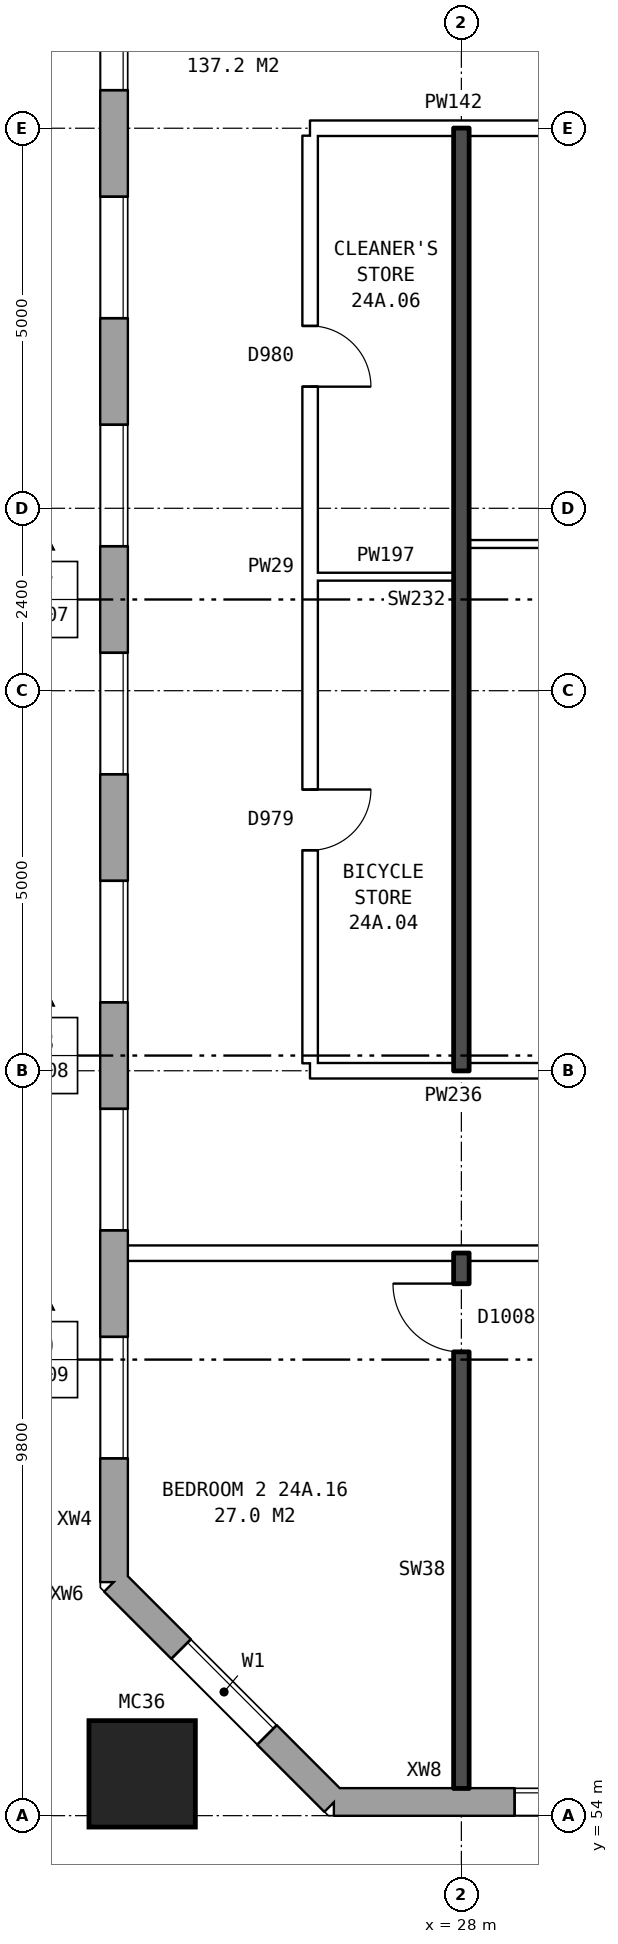
"""IFC4 building model, lengths in metres.
Left out: names, types, materials, properties, quantities, classifications, styles, units other than length and angle.
Written with IfcOpenShell. Run it as: python <this file> out.ifc"""

import sys

from ifc_helpers import new_model, si_unit, direction, frame, frame_2d, origin, origin_2d, place, context, subcontext, project, spatial, rectangle, hollow_rectangle, extrude, element, fill, save


model = new_model("IFC4")
c1 = context("Model", 3, precision=1e-05, world=origin(), true_north=direction((0.0, 1.0)))
c2 = subcontext(c1, "Body", "Model", "MODEL_VIEW")
j1 = project(units=[si_unit("LENGTHUNIT", "METRE"), si_unit("PLANEANGLEUNIT", "RADIAN")], contexts=[c1])
p1 = place(None, origin())
s1 = spatial("IfcSite", under=j1, at=p1, CompositionType="ELEMENT")
p2 = place(p1, origin())
s2 = spatial("IfcBuilding", under=s1, at=p2, CompositionType="ELEMENT")
p3 = place(p2, frame((0.0, 0.0, 87.1)))
s3 = spatial("IfcBuildingStorey", under=s2, at=p3, CompositionType="ELEMENT", Elevation=87.1)
p4 = place(p3, frame((23.8, 54.55, 0.0), z_axis=(0.0, 0.0, 1.0), x_axis=(1.0, 0.0, 0.0)))
e1 = element("IfcColumn", 1, at=p4, inside=s3, PredefinedType="COLUMN", context=c2, shape_type="SweptSolid", body=[
    extrude(hollow_rectangle(XDim=1.4, YDim=1.4, WallThickness=0.075, at=origin_2d()), origin(), (0.0, 0.0, 1.0), 3.1),
])
p5 = place(p3, frame((23.43, 57.075, 0.0), z_axis=(0.0, 0.0, 1.0), x_axis=(0.707106781187, -0.707106781187, 0.0)))
e2 = element("IfcWall", 2, at=p5, inside=s3, PredefinedType="STANDARD", context=c2, shape_type="SweptSolid", body=[
    extrude(rectangle(XDim=4.094, YDim=0.36, at=frame_2d((2.047, 0.0))), origin(), (0.0, 0.0, 1.0), 2.85),
])
p6 = place(p5, frame((1.247, 0.0, 0.8)))
e3 = element("IfcOpeningElement", 3, at=p6, cuts=e2, PredefinedType="OPENING", context=c2, shape_type="SweptSolid", body=[
    extrude(rectangle(XDim=1.6, YDim=1.8, at=frame_2d((0.8, 0.9))), frame((0.0, 0.19, 0.0), z_axis=(0.0, -1.0, 0.0), x_axis=(1.0, 0.0, 0.0)), (0.0, 0.0, 1.0), 0.38),
])
p7 = place(p3, frame((26.325, 54.18, 0.0), z_axis=(0.0, 0.0, 1.0), x_axis=(1.0, 0.0, 0.0)))
e4 = element("IfcWall", 4, at=p7, inside=s3, PredefinedType="STANDARD", context=c2, shape_type="SweptSolid", body=[
    extrude(rectangle(XDim=46.601, YDim=0.36, at=frame_2d((23.3, 0.0))), origin(), (0.0, 0.0, 1.0), 2.85),
])
p8 = place(p7, frame((2.375, 0.0, 0.8)))
e5 = element("IfcOpeningElement", 5, at=p8, cuts=e4, PredefinedType="OPENING", context=c2, shape_type="SweptSolid", body=[
    extrude(rectangle(XDim=1.6, YDim=1.8, at=frame_2d((0.8, 0.9))), frame((0.0, 0.19, 0.0), z_axis=(0.0, -1.0, 0.0), x_axis=(1.0, 0.0, 0.0)), (0.0, 0.0, 1.0), 0.38),
])
p9 = place(p7, frame((5.375, 0.0, 0.8)))
e6 = element("IfcOpeningElement", 6, at=p9, cuts=e4, PredefinedType="OPENING", context=c2, shape_type="SweptSolid", body=[
    extrude(rectangle(XDim=1.6, YDim=1.8, at=frame_2d((0.8, 0.9))), frame((0.0, 0.19, 0.0), z_axis=(0.0, -1.0, 0.0), x_axis=(1.0, 0.0, 0.0)), (0.0, 0.0, 1.0), 0.38),
])
p10 = place(p7, frame((8.375, 0.0, 0.8)))
e7 = element("IfcOpeningElement", 7, at=p10, cuts=e4, PredefinedType="OPENING", context=c2, shape_type="SweptSolid", body=[
    extrude(rectangle(XDim=1.6, YDim=1.8, at=frame_2d((0.8, 0.9))), frame((0.0, 0.19, 0.0), z_axis=(0.0, -1.0, 0.0), x_axis=(1.0, 0.0, 0.0)), (0.0, 0.0, 1.0), 0.38),
])
p11 = place(p7, frame((11.375, 0.0, 0.8)))
e8 = element("IfcOpeningElement", 8, at=p11, cuts=e4, PredefinedType="OPENING", context=c2, shape_type="SweptSolid", body=[
    extrude(rectangle(XDim=1.6, YDim=1.8, at=frame_2d((0.8, 0.9))), frame((0.0, 0.19, 0.0), z_axis=(0.0, -1.0, 0.0), x_axis=(1.0, 0.0, 0.0)), (0.0, 0.0, 1.0), 0.38),
])
p12 = place(p7, frame((14.375, 0.0, 0.8)))
e9 = element("IfcOpeningElement", 9, at=p12, cuts=e4, PredefinedType="OPENING", context=c2, shape_type="SweptSolid", body=[
    extrude(rectangle(XDim=1.6, YDim=1.8, at=frame_2d((0.8, 0.9))), frame((0.0, 0.19, 0.0), z_axis=(0.0, -1.0, 0.0), x_axis=(1.0, 0.0, 0.0)), (0.0, 0.0, 1.0), 0.38),
])
p13 = place(p7, frame((17.375, 0.0, 0.8)))
e10 = element("IfcOpeningElement", 10, at=p13, cuts=e4, PredefinedType="OPENING", context=c2, shape_type="SweptSolid", body=[
    extrude(rectangle(XDim=1.6, YDim=1.8, at=frame_2d((0.8, 0.9))), frame((0.0, 0.19, 0.0), z_axis=(0.0, -1.0, 0.0), x_axis=(1.0, 0.0, 0.0)), (0.0, 0.0, 1.0), 0.38),
])
p14 = place(p7, frame((19.875, 0.0, 1.4)))
e11 = element("IfcOpeningElement", 11, at=p14, cuts=e4, PredefinedType="OPENING", context=c2, shape_type="SweptSolid", body=[
    extrude(rectangle(XDim=1.2, YDim=1.2, at=frame_2d((0.6, 0.6))), frame((0.0, 0.19, 0.0), z_axis=(0.0, -1.0, 0.0), x_axis=(1.0, 0.0, 0.0)), (0.0, 0.0, 1.0), 0.38),
])
p15 = place(p7, frame((22.825, 0.0, 0.25)))
e12 = element("IfcOpeningElement", 12, at=p15, cuts=e4, PredefinedType="OPENING", context=c2, shape_type="SweptSolid", body=[
    extrude(rectangle(XDim=0.8, YDim=1.5, at=frame_2d((0.4, 0.75))), frame((0.0, 0.19, 0.0), z_axis=(0.0, -1.0, 0.0), x_axis=(1.0, 0.0, 0.0)), (0.0, 0.0, 1.0), 0.38),
])
p16 = place(p7, frame((26.375, 0.0, 0.8)))
e13 = element("IfcOpeningElement", 13, at=p16, cuts=e4, PredefinedType="OPENING", context=c2, shape_type="SweptSolid", body=[
    extrude(rectangle(XDim=1.6, YDim=1.8, at=frame_2d((0.8, 0.9))), frame((0.0, 0.19, 0.0), z_axis=(0.0, -1.0, 0.0), x_axis=(1.0, 0.0, 0.0)), (0.0, 0.0, 1.0), 0.38),
])
p17 = place(p7, frame((29.375, 0.0, 0.8)))
e14 = element("IfcOpeningElement", 14, at=p17, cuts=e4, PredefinedType="OPENING", context=c2, shape_type="SweptSolid", body=[
    extrude(rectangle(XDim=1.6, YDim=1.8, at=frame_2d((0.8, 0.9))), frame((0.0, 0.19, 0.0), z_axis=(0.0, -1.0, 0.0), x_axis=(1.0, 0.0, 0.0)), (0.0, 0.0, 1.0), 0.38),
])
p18 = place(p7, frame((32.375, 0.0, 0.8)))
e15 = element("IfcOpeningElement", 15, at=p18, cuts=e4, PredefinedType="OPENING", context=c2, shape_type="SweptSolid", body=[
    extrude(rectangle(XDim=1.6, YDim=1.8, at=frame_2d((0.8, 0.9))), frame((0.0, 0.19, 0.0), z_axis=(0.0, -1.0, 0.0), x_axis=(1.0, 0.0, 0.0)), (0.0, 0.0, 1.0), 0.38),
])
p19 = place(p7, frame((35.375, 0.0, 0.8)))
e16 = element("IfcOpeningElement", 16, at=p19, cuts=e4, PredefinedType="OPENING", context=c2, shape_type="SweptSolid", body=[
    extrude(rectangle(XDim=1.6, YDim=1.8, at=frame_2d((0.8, 0.9))), frame((0.0, 0.19, 0.0), z_axis=(0.0, -1.0, 0.0), x_axis=(1.0, 0.0, 0.0)), (0.0, 0.0, 1.0), 0.38),
])
p20 = place(p7, frame((38.375, 0.0, 0.8)))
e17 = element("IfcOpeningElement", 17, at=p20, cuts=e4, PredefinedType="OPENING", context=c2, shape_type="SweptSolid", body=[
    extrude(rectangle(XDim=1.6, YDim=1.8, at=frame_2d((0.8, 0.9))), frame((0.0, 0.19, 0.0), z_axis=(0.0, -1.0, 0.0), x_axis=(1.0, 0.0, 0.0)), (0.0, 0.0, 1.0), 0.38),
])
p21 = place(p7, frame((41.375, 0.0, 0.8)))
e18 = element("IfcOpeningElement", 18, at=p21, cuts=e4, PredefinedType="OPENING", context=c2, shape_type="SweptSolid", body=[
    extrude(rectangle(XDim=1.6, YDim=1.8, at=frame_2d((0.8, 0.9))), frame((0.0, 0.19, 0.0), z_axis=(0.0, -1.0, 0.0), x_axis=(1.0, 0.0, 0.0)), (0.0, 0.0, 1.0), 0.38),
])
p22 = place(p7, frame((44.375, 0.0, 0.8)))
e19 = element("IfcOpeningElement", 19, at=p22, cuts=e4, PredefinedType="OPENING", context=c2, shape_type="SweptSolid", body=[
    extrude(rectangle(XDim=1.6, YDim=1.8, at=frame_2d((0.8, 0.9))), frame((0.0, 0.19, 0.0), z_axis=(0.0, -1.0, 0.0), x_axis=(1.0, 0.0, 0.0)), (0.0, 0.0, 1.0), 0.38),
])
p23 = place(p7, frame((23.925, 0.0, 0.15)))
e20 = element("IfcOpeningElement", 20, at=p23, cuts=e4, PredefinedType="OPENING", context=c2, shape_type="SweptSolid", body=[
    extrude(rectangle(XDim=0.6, YDim=0.9, at=frame_2d((0.3, 0.45))), frame((0.0, 0.19, 0.0), z_axis=(0.0, -1.0, 0.0), x_axis=(1.0, 0.0, 0.0)), (0.0, 0.0, 1.0), 0.38),
])
p24 = place(p3, frame((23.43, 82.925, 0.0), z_axis=(0.0, 0.0, 1.0), x_axis=(0.0, -1.0, 0.0)))
e21 = element("IfcWall", 21, at=p24, inside=s3, PredefinedType="STANDARD", context=c2, shape_type="SweptSolid", body=[
    extrude(rectangle(XDim=25.851, YDim=0.36, at=frame_2d((12.925, 0.0))), origin(), (0.0, 0.0, 1.0), 2.85),
])
p25 = place(p24, frame((1.625, 0.0, 0.8)))
e22 = element("IfcOpeningElement", 22, at=p25, cuts=e21, PredefinedType="OPENING", context=c2, shape_type="SweptSolid", body=[
    extrude(rectangle(XDim=1.6, YDim=1.8, at=frame_2d((0.8, 0.9))), frame((0.0, 0.19, 0.0), z_axis=(0.0, -1.0, 0.0), x_axis=(1.0, 0.0, 0.0)), (0.0, 0.0, 1.0), 0.38),
])
p26 = place(p24, frame((4.625, 0.0, 0.8)))
e23 = element("IfcOpeningElement", 23, at=p26, cuts=e21, PredefinedType="OPENING", context=c2, shape_type="SweptSolid", body=[
    extrude(rectangle(XDim=1.6, YDim=1.8, at=frame_2d((0.8, 0.9))), frame((0.0, 0.19, 0.0), z_axis=(0.0, -1.0, 0.0), x_axis=(1.0, 0.0, 0.0)), (0.0, 0.0, 1.0), 0.38),
])
p27 = place(p24, frame((7.625, 0.0, 0.8)))
e24 = element("IfcOpeningElement", 24, at=p27, cuts=e21, PredefinedType="OPENING", context=c2, shape_type="SweptSolid", body=[
    extrude(rectangle(XDim=1.6, YDim=1.8, at=frame_2d((0.8, 0.9))), frame((0.0, 0.19, 0.0), z_axis=(0.0, -1.0, 0.0), x_axis=(1.0, 0.0, 0.0)), (0.0, 0.0, 1.0), 0.38),
])
p28 = place(p24, frame((10.625, 0.0, 0.8)))
e25 = element("IfcOpeningElement", 25, at=p28, cuts=e21, PredefinedType="OPENING", context=c2, shape_type="SweptSolid", body=[
    extrude(rectangle(XDim=1.6, YDim=1.8, at=frame_2d((0.8, 0.9))), frame((0.0, 0.19, 0.0), z_axis=(0.0, -1.0, 0.0), x_axis=(1.0, 0.0, 0.0)), (0.0, 0.0, 1.0), 0.38),
])
p29 = place(p24, frame((13.625, 0.0, 0.8)))
e26 = element("IfcOpeningElement", 26, at=p29, cuts=e21, PredefinedType="OPENING", context=c2, shape_type="SweptSolid", body=[
    extrude(rectangle(XDim=1.6, YDim=1.8, at=frame_2d((0.8, 0.9))), frame((0.0, 0.19, 0.0), z_axis=(0.0, -1.0, 0.0), x_axis=(1.0, 0.0, 0.0)), (0.0, 0.0, 1.0), 0.38),
])
p30 = place(p24, frame((16.625, 0.0, 0.8)))
e27 = element("IfcOpeningElement", 27, at=p30, cuts=e21, PredefinedType="OPENING", context=c2, shape_type="SweptSolid", body=[
    extrude(rectangle(XDim=1.6, YDim=1.8, at=frame_2d((0.8, 0.9))), frame((0.0, 0.19, 0.0), z_axis=(0.0, -1.0, 0.0), x_axis=(1.0, 0.0, 0.0)), (0.0, 0.0, 1.0), 0.38),
])
p31 = place(p24, frame((19.625, 0.0, 0.8)))
e28 = element("IfcOpeningElement", 28, at=p31, cuts=e21, PredefinedType="OPENING", context=c2, shape_type="SweptSolid", body=[
    extrude(rectangle(XDim=1.6, YDim=1.8, at=frame_2d((0.8, 0.9))), frame((0.0, 0.19, 0.0), z_axis=(0.0, -1.0, 0.0), x_axis=(1.0, 0.0, 0.0)), (0.0, 0.0, 1.0), 0.38),
])
p32 = place(p24, frame((22.625, 0.0, 0.8)))
e29 = element("IfcOpeningElement", 29, at=p32, cuts=e21, PredefinedType="OPENING", context=c2, shape_type="SweptSolid", body=[
    extrude(rectangle(XDim=1.6, YDim=1.8, at=frame_2d((0.8, 0.9))), frame((0.0, 0.19, 0.0), z_axis=(0.0, -1.0, 0.0), x_axis=(1.0, 0.0, 0.0)), (0.0, 0.0, 1.0), 0.38),
])
p33 = place(p3, frame((23.61, 61.4, 0.0), z_axis=(0.0, 0.0, 1.0), x_axis=(1.0, 0.0, 0.0)))
e30 = element("IfcWall", 30, at=p33, inside=s3, PredefinedType="PARTITIONING", context=c2, shape_type="SweptSolid", body=[
    extrude(rectangle(XDim=22.29, YDim=0.2, at=frame_2d((11.145, 0.0))), origin(), (0.0, 0.0, 1.0), 2.85),
])
p34 = place(p33, frame((18.84, 0.0, 0.0)))
e31 = element("IfcOpeningElement", 31, at=p34, cuts=e30, PredefinedType="OPENING", context=c2, shape_type="SweptSolid", body=[
    extrude(rectangle(XDim=1.0, YDim=2.1, at=frame_2d((0.5, 1.05))), frame((0.0, 0.11, 0.0), z_axis=(0.0, -1.0, 0.0), x_axis=(1.0, 0.0, 0.0)), (0.0, 0.0, 1.0), 0.22),
])
p35 = place(p33, frame((6.89, 0.0, 0.0)))
e32 = element("IfcOpeningElement", 32, at=p35, cuts=e30, PredefinedType="OPENING", context=c2, shape_type="SweptSolid", body=[
    extrude(rectangle(XDim=1.0, YDim=2.1, at=frame_2d((0.5, 1.05))), frame((0.0, 0.11, 0.0), z_axis=(0.0, -1.0, 0.0), x_axis=(1.0, 0.0, 0.0)), (0.0, 0.0, 1.0), 0.22),
])
p36 = place(p3, frame((26.01, 63.8, 0.0), z_axis=(0.0, 0.0, 1.0), x_axis=(1.0, 0.0, 0.0)))
e33 = element("IfcWall", 33, at=p36, inside=s3, PredefinedType="PARTITIONING", context=c2, shape_type="SweptSolid", body=[
    extrude(rectangle(XDim=6.35, YDim=0.2, at=frame_2d((3.175, 0.0))), origin(), (0.0, 0.0, 1.0), 2.85),
])
p37 = place(p36, frame((3.77, 0.0, 0.0)))
e34 = element("IfcOpeningElement", 34, at=p37, cuts=e33, PredefinedType="OPENING", context=c2, shape_type="SweptSolid", body=[
    extrude(rectangle(XDim=0.8, YDim=2.1, at=frame_2d((0.4, 1.05))), frame((0.0, 0.11, 0.0), z_axis=(0.0, -1.0, 0.0), x_axis=(1.0, 0.0, 0.0)), (0.0, 0.0, 1.0), 0.22),
])
p38 = place(p3, frame((26.11, 70.3, 0.0), z_axis=(0.0, 0.0, 1.0), x_axis=(1.0, 0.0, 0.0)))
e35 = element("IfcWall", 35, at=p38, inside=s3, PredefinedType="PARTITIONING", context=c2, shape_type="SweptSolid", body=[
    extrude(rectangle(XDim=1.79, YDim=0.1, at=frame_2d((0.895, 0.0))), origin(), (0.0, 0.0, 1.0), 2.85),
])
p39 = place(p3, frame((28.1, 70.73, 0.0), z_axis=(0.0, 0.0, 1.0), x_axis=(1.0, 0.0, 0.0)))
e36 = element("IfcWall", 36, at=p39, inside=s3, PredefinedType="PARTITIONING", context=c2, shape_type="SweptSolid", body=[
    extrude(rectangle(XDim=4.26, YDim=0.1, at=frame_2d((2.13, 0.0))), origin(), (0.0, 0.0, 1.0), 2.85),
])
p40 = place(p3, frame((26.01, 76.2, 0.0), z_axis=(0.0, 0.0, 1.0), x_axis=(1.0, 0.0, 0.0)))
e37 = element("IfcWall", 37, at=p40, inside=s3, PredefinedType="PARTITIONING", context=c2, shape_type="SweptSolid", body=[
    extrude(rectangle(XDim=6.35, YDim=0.2, at=frame_2d((3.175, 0.0))), origin(), (0.0, 0.0, 1.0), 2.85),
])
p41 = place(p40, frame((3.77, 0.0, 0.0)))
e38 = element("IfcOpeningElement", 38, at=p41, cuts=e37, PredefinedType="OPENING", context=c2, shape_type="SweptSolid", body=[
    extrude(rectangle(XDim=0.8, YDim=2.1, at=frame_2d((0.4, 1.05))), frame((0.0, 0.11, 0.0), z_axis=(0.0, -1.0, 0.0), x_axis=(1.0, 0.0, 0.0)), (0.0, 0.0, 1.0), 0.22),
])
p42 = place(p3, frame((26.01, 63.9, 0.0), z_axis=(0.0, 0.0, 1.0), x_axis=(0.0, 1.0, 0.0)))
e39 = element("IfcWall", 39, at=p42, inside=s3, PredefinedType="PARTITIONING", context=c2, shape_type="SweptSolid", body=[
    extrude(rectangle(XDim=12.2, YDim=0.2, at=frame_2d((6.1, 0.0))), origin(), (0.0, 0.0, 1.0), 2.85),
])
p43 = place(p42, frame((2.8, 0.0, 0.0)))
e40 = element("IfcOpeningElement", 40, at=p43, cuts=e39, PredefinedType="OPENING", context=c2, shape_type="SweptSolid", body=[
    extrude(rectangle(XDim=0.8, YDim=2.1, at=frame_2d((0.4, 1.05))), frame((0.0, 0.11, 0.0), z_axis=(0.0, -1.0, 0.0), x_axis=(1.0, 0.0, 0.0)), (0.0, 0.0, 1.0), 0.22),
])
p44 = place(p42, frame((8.9, 0.0, 0.0)))
e41 = element("IfcOpeningElement", 41, at=p44, cuts=e39, PredefinedType="OPENING", context=c2, shape_type="SweptSolid", body=[
    extrude(rectangle(XDim=0.8, YDim=2.1, at=frame_2d((0.4, 1.05))), frame((0.0, 0.11, 0.0), z_axis=(0.0, -1.0, 0.0), x_axis=(1.0, 0.0, 0.0)), (0.0, 0.0, 1.0), 0.22),
])
p45 = place(p3, frame((28.0, 54.36, 0.0), z_axis=(0.0, 0.0, 1.0), x_axis=(0.0, 1.0, 0.0)))
e42 = element("IfcWall", 42, at=p45, inside=s3, PredefinedType="SOLIDWALL", context=c2, shape_type="SweptSolid", body=[
    extrude(rectangle(XDim=7.04, YDim=0.2, at=frame_2d((3.52, 0.0))), origin(), (0.0, 0.0, 1.0), 2.85),
])
p46 = place(p45, frame((5.74, 0.0, 0.0)))
e43 = element("IfcOpeningElement", 43, at=p46, cuts=e42, PredefinedType="OPENING", context=c2, shape_type="SweptSolid", body=[
    extrude(rectangle(XDim=0.9, YDim=2.1, at=frame_2d((0.45, 1.05))), frame((0.0, 0.11, 0.0), z_axis=(0.0, -1.0, 0.0), x_axis=(1.0, 0.0, 0.0)), (0.0, 0.0, 1.0), 0.22),
])
p47 = place(p3, frame((28.0, 63.8, 0.0), z_axis=(0.0, 0.0, 1.0), x_axis=(0.0, 1.0, 0.0)))
e44 = element("IfcWall", 44, at=p47, inside=s3, PredefinedType="SOLIDWALL", context=c2, shape_type="SweptSolid", body=[
    extrude(rectangle(XDim=12.4, YDim=0.2, at=frame_2d((6.2, 0.0))), origin(), (0.0, 0.0, 1.0), 2.85),
])
p48 = place(p6, origin())
e45 = element("IfcWindow", 45, at=p48, inside=s3, PartitioningType="SINGLE_PANEL", PredefinedType="WINDOW", context=c2, shape_type="SweptSolid", body=[
    extrude(rectangle(XDim=1.6, YDim=1.8, at=frame_2d((0.8, 0.9))), frame((0.0, 0.15, 0.0), z_axis=(0.0, -1.0, 0.0), x_axis=(1.0, 0.0, 0.0)), (0.0, 0.0, 1.0), 0.06),
])
fill(e3, e45)
p49 = place(p8, origin())
e46 = element("IfcWindow", 46, at=p49, inside=s3, PartitioningType="SINGLE_PANEL", PredefinedType="WINDOW", context=c2, shape_type="SweptSolid", body=[
    extrude(rectangle(XDim=1.6, YDim=1.8, at=frame_2d((0.8, 0.9))), frame((0.0, 0.15, 0.0), z_axis=(0.0, -1.0, 0.0), x_axis=(1.0, 0.0, 0.0)), (0.0, 0.0, 1.0), 0.06),
])
fill(e5, e46)
p50 = place(p26, origin())
e47 = element("IfcWindow", 47, at=p50, inside=s3, PartitioningType="SINGLE_PANEL", PredefinedType="WINDOW", context=c2, shape_type="SweptSolid", body=[
    extrude(rectangle(XDim=1.6, YDim=1.8, at=frame_2d((0.8, 0.9))), frame((0.0, 0.15, 0.0), z_axis=(0.0, -1.0, 0.0), x_axis=(1.0, 0.0, 0.0)), (0.0, 0.0, 1.0), 0.06),
])
fill(e23, e47)
p51 = place(p27, origin())
e48 = element("IfcWindow", 48, at=p51, inside=s3, PartitioningType="SINGLE_PANEL", PredefinedType="WINDOW", context=c2, shape_type="SweptSolid", body=[
    extrude(rectangle(XDim=1.6, YDim=1.8, at=frame_2d((0.8, 0.9))), frame((0.0, 0.15, 0.0), z_axis=(0.0, -1.0, 0.0), x_axis=(1.0, 0.0, 0.0)), (0.0, 0.0, 1.0), 0.06),
])
fill(e24, e48)
p52 = place(p28, origin())
e49 = element("IfcWindow", 49, at=p52, inside=s3, PartitioningType="SINGLE_PANEL", PredefinedType="WINDOW", context=c2, shape_type="SweptSolid", body=[
    extrude(rectangle(XDim=1.6, YDim=1.8, at=frame_2d((0.8, 0.9))), frame((0.0, 0.15, 0.0), z_axis=(0.0, -1.0, 0.0), x_axis=(1.0, 0.0, 0.0)), (0.0, 0.0, 1.0), 0.06),
])
fill(e25, e49)
p53 = place(p29, origin())
e50 = element("IfcWindow", 50, at=p53, inside=s3, PartitioningType="SINGLE_PANEL", PredefinedType="WINDOW", context=c2, shape_type="SweptSolid", body=[
    extrude(rectangle(XDim=1.6, YDim=1.8, at=frame_2d((0.8, 0.9))), frame((0.0, 0.15, 0.0), z_axis=(0.0, -1.0, 0.0), x_axis=(1.0, 0.0, 0.0)), (0.0, 0.0, 1.0), 0.06),
])
fill(e26, e50)
p54 = place(p30, origin())
e51 = element("IfcWindow", 51, at=p54, inside=s3, PartitioningType="SINGLE_PANEL", PredefinedType="WINDOW", context=c2, shape_type="SweptSolid", body=[
    extrude(rectangle(XDim=1.6, YDim=1.8, at=frame_2d((0.8, 0.9))), frame((0.0, 0.15, 0.0), z_axis=(0.0, -1.0, 0.0), x_axis=(1.0, 0.0, 0.0)), (0.0, 0.0, 1.0), 0.06),
])
fill(e27, e51)
p55 = place(p31, origin())
e52 = element("IfcWindow", 52, at=p55, inside=s3, PartitioningType="SINGLE_PANEL", PredefinedType="WINDOW", context=c2, shape_type="SweptSolid", body=[
    extrude(rectangle(XDim=1.6, YDim=1.8, at=frame_2d((0.8, 0.9))), frame((0.0, 0.15, 0.0), z_axis=(0.0, -1.0, 0.0), x_axis=(1.0, 0.0, 0.0)), (0.0, 0.0, 1.0), 0.06),
])
fill(e28, e52)
p56 = place(p32, origin())
e53 = element("IfcWindow", 53, at=p56, inside=s3, PartitioningType="SINGLE_PANEL", PredefinedType="WINDOW", context=c2, shape_type="SweptSolid", body=[
    extrude(rectangle(XDim=1.6, YDim=1.8, at=frame_2d((0.8, 0.9))), frame((0.0, 0.15, 0.0), z_axis=(0.0, -1.0, 0.0), x_axis=(1.0, 0.0, 0.0)), (0.0, 0.0, 1.0), 0.06),
])
fill(e29, e53)
p57 = place(p43, frame((0.8, 0.0, 0.0), z_axis=(0.0, 0.0, 1.0), x_axis=(-1.0, 0.0, 0.0)))
e54 = element("IfcDoor", 54, at=p57, inside=s3, OperationType="SINGLE_SWING_LEFT", PredefinedType="DOOR", context=c2, shape_type="SweptSolid", body=[
    extrude(rectangle(XDim=0.8, YDim=2.1, at=frame_2d((0.4, 1.05))), frame((0.0, 0.025, 0.0), z_axis=(0.0, -1.0, 0.0), x_axis=(1.0, 0.0, 0.0)), (0.0, 0.0, 1.0), 0.05),
])
fill(e40, e54)
p58 = place(p44, frame((0.8, 0.0, 0.0), z_axis=(0.0, 0.0, 1.0), x_axis=(-1.0, 0.0, 0.0)))
e55 = element("IfcDoor", 55, at=p58, inside=s3, OperationType="SINGLE_SWING_RIGHT", PredefinedType="DOOR", context=c2, shape_type="SweptSolid", body=[
    extrude(rectangle(XDim=0.8, YDim=2.1, at=frame_2d((0.4, 1.05))), frame((0.0, 0.025, 0.0), z_axis=(0.0, -1.0, 0.0), x_axis=(1.0, 0.0, 0.0)), (0.0, 0.0, 1.0), 0.05),
])
fill(e41, e55)
p59 = place(p46, origin())
e56 = element("IfcDoor", 56, at=p59, inside=s3, OperationType="SINGLE_SWING_RIGHT", PredefinedType="DOOR", context=c2, shape_type="SweptSolid", body=[
    extrude(rectangle(XDim=0.9, YDim=2.1, at=frame_2d((0.45, 1.05))), frame((0.0, 0.025, 0.0), z_axis=(0.0, -1.0, 0.0), x_axis=(1.0, 0.0, 0.0)), (0.0, 0.0, 1.0), 0.05),
])
fill(e43, e56)
save(model, sys.argv[1])
